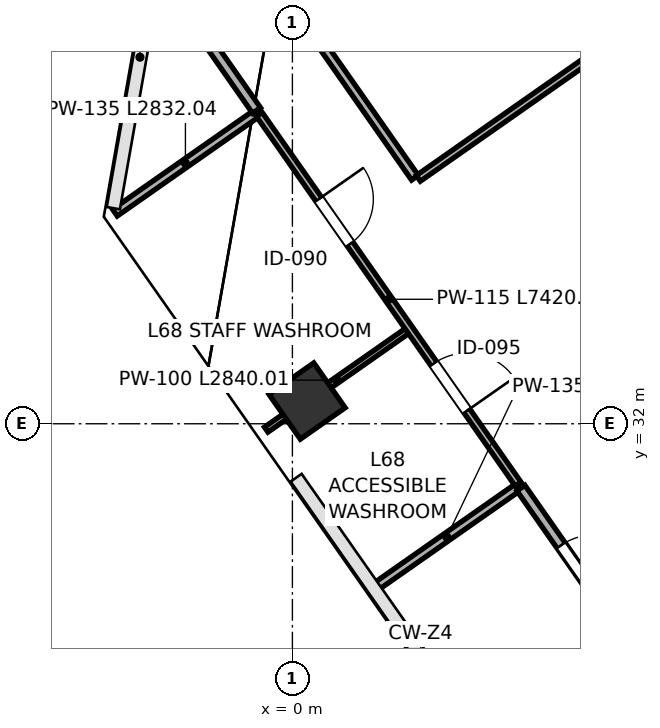
"""IFC4 building model, lengths in metres.
Left out: names, types, materials, properties, quantities, classifications, styles, units other than length and angle.
Written with IfcOpenShell. Run it as: python <this file> out.ifc"""

import sys

from ifc_helpers import new_model, si_unit, direction, frame, frame_2d, origin, origin_2d, place, context, subcontext, project, spatial, rectangle, extrude, clip, halfspace, source, transform, mapped, element, fill, save


model = new_model("IFC4")
c1 = context("Model", 3, precision=1e-05, world=origin(), true_north=direction((0.0, 1.0)))
c2 = subcontext(c1, "Body", "Model", "MODEL_VIEW")
j1 = project(units=[si_unit("LENGTHUNIT", "METRE"), si_unit("PLANEANGLEUNIT", "RADIAN")], contexts=[c1])
p1 = place(None, origin())
s1 = spatial("IfcSite", under=j1, at=p1, CompositionType="ELEMENT")
p2 = place(p1, origin())
s2 = spatial("IfcBuilding", under=s1, at=p2, CompositionType="ELEMENT")
p3 = place(p2, frame((0.0, 0.0, 303.0)))
s3 = spatial("IfcBuildingStorey", under=s2, at=p3, CompositionType="ELEMENT", Elevation=303.0)
p4 = place(p3, frame((0.241, 32.374, 0.0), z_axis=(0.008457413638, 0.215522144854, 0.976462327605), x_axis=(0.541771313725, -0.821746656519, 0.176681284024)))
e1 = element("IfcColumn", 1, at=p4, inside=s3, PredefinedType="COLUMN", context=c2, shape_type="Clipping", body=[
    clip(clip(extrude(rectangle(XDim=0.9, YDim=0.9, at=origin_2d()), origin(), (0.0, 0.0, 1.0), 4.301), halfspace(frame((0.0, 0.0, 0.139), z_axis=(0.0, 0.0, -1.0), x_axis=(1.0, 0.0, 0.0)), False)), halfspace(frame((0.0, 0.0, 4.162), z_axis=(0.0, 0.0, 1.0), x_axis=(1.0, 0.0, 0.0)), False)),
])
p5 = place(p3, frame((-2.919, 35.471, 0.0), z_axis=(0.0, 0.0, 1.0), x_axis=(0.819098241059, 0.573653267657, 0.0)))
e2 = element("IfcWall", 2, at=p5, inside=s3, PredefinedType="PARTITIONING", context=c2, shape_type="SweptSolid", body=[
    extrude(rectangle(XDim=2.832, YDim=0.135, at=frame_2d((1.416, 0.0))), origin(), (0.0, 0.0, 1.0), 3.96),
])
p6 = place(p3, frame((-2.214, 39.471, 0.0), z_axis=(0.0, 0.0, 1.0), x_axis=(0.573653267657, -0.819098241059, 0.0)))
e3 = element("IfcWall", 3, at=p6, inside=s3, PredefinedType="PARTITIONING", context=c2, shape_type="SweptSolid", body=[
    extrude(rectangle(XDim=2.832, YDim=0.16, at=frame_2d((1.416, 0.0))), origin(), (0.0, 0.0, 1.0), 3.96),
])
p7 = place(p3, frame((-0.431, 31.904, 0.0), z_axis=(0.0, 0.0, 1.0), x_axis=(0.819122867865, 0.573618102347, 0.0)))
e4 = element("IfcWall", 4, at=p7, inside=s3, PredefinedType="PARTITIONING", context=c2, shape_type="SweptSolid", body=[
    extrude(rectangle(XDim=2.84, YDim=0.1, at=frame_2d((1.42, 0.0))), origin(), (0.0, 0.0, 1.0), 3.295),
])
p8 = place(p3, frame((1.376, 29.323, 0.0), z_axis=(0.0, 0.0, 1.0), x_axis=(0.819163257805, 0.573560421458, 0.0)))
e5 = element("IfcWall", 5, at=p8, inside=s3, PredefinedType="PARTITIONING", context=c2, shape_type="SweptSolid", body=[
    extrude(rectangle(XDim=2.84, YDim=0.135, at=frame_2d((1.42, 0.0))), origin(), (0.0, 0.0, 1.0), 3.295),
])
p9 = place(p3, frame((-0.544, 37.086, 0.0), z_axis=(0.0, 0.0, 1.0), x_axis=(0.573568336404, -0.819157715873, 0.0)))
e6 = element("IfcWall", 6, at=p9, inside=s3, PredefinedType="PARTITIONING", context=c2, shape_type="SweptSolid", body=[
    extrude(rectangle(XDim=7.42, YDim=0.115, at=frame_2d((3.71, 0.0))), origin(), (0.0, 0.0, 1.0), 3.96),
])
p10 = place(p9, frame((1.7, 0.0, 0.0)))
e7 = element("IfcOpeningElement", 7, at=p10, cuts=e6, PredefinedType="OPENING", context=c2, shape_type="SweptSolid", body=[
    extrude(rectangle(XDim=0.9, YDim=2.15, at=frame_2d((0.45, 1.075))), frame((0.0, 0.067, 0.0), z_axis=(0.0, -1.0, 0.0), x_axis=(1.0, 0.0, 0.0)), (0.0, 0.0, 1.0), 0.135),
])
p11 = place(p9, frame((5.0, 0.0, 0.0)))
e8 = element("IfcOpeningElement", 8, at=p11, cuts=e6, PredefinedType="OPENING", context=c2, shape_type="SweptSolid", body=[
    extrude(rectangle(XDim=0.95, YDim=2.15, at=frame_2d((0.475, 1.075))), frame((0.0, 0.067, 0.0), z_axis=(0.0, -1.0, 0.0), x_axis=(1.0, 0.0, 0.0)), (0.0, 0.0, 1.0), 0.135),
])
p12 = place(p3, frame((3.758, 30.942, 0.0), z_axis=(0.0, 0.0, 1.0), x_axis=(0.573575634469, -0.819152605772, 0.0)))
e9 = element("IfcWall", 9, at=p12, inside=s3, PredefinedType="PARTITIONING", context=c2, shape_type="SweptSolid", body=[
    extrude(rectangle(XDim=11.57, YDim=0.16, at=frame_2d((5.785, 0.0))), origin(), (0.0, 0.0, 1.0), 3.96),
])
p13 = place(p12, frame((1.15, 0.0, 0.0)))
e10 = element("IfcOpeningElement", 10, at=p13, cuts=e9, PredefinedType="OPENING", context=c2, shape_type="SweptSolid", body=[
    extrude(rectangle(XDim=0.95, YDim=2.15, at=frame_2d((0.475, 1.075))), frame((0.0, 0.09, 0.0), z_axis=(0.0, -1.0, 0.0), x_axis=(1.0, 0.0, 0.0)), (0.0, 0.0, 1.0), 0.18),
])
p14 = place(p3, frame((-1.443, 40.985, 0.0), z_axis=(0.0, 0.0, 1.0), x_axis=(0.573587332855, -0.819144414367, 0.0)))
e11 = element("IfcWall", 11, at=p14, inside=s3, PredefinedType="PARTITIONING", context=c2, shape_type="SweptSolid", body=[
    extrude(rectangle(XDim=6.03, YDim=0.135, at=frame_2d((3.015, 0.0))), origin(), (0.0, 0.0, 1.0), 3.96),
])
p15 = place(p3, frame((2.071, 36.036, 0.0), z_axis=(0.0, 0.0, 1.0), x_axis=(0.819154854942, 0.573572422302, 0.0)))
e12 = element("IfcWall", 12, at=p15, inside=s3, PredefinedType="PARTITIONING", context=c2, shape_type="SweptSolid", body=[
    extrude(rectangle(XDim=29.62, YDim=0.115, at=frame_2d((14.81, 0.0))), origin(), (0.0, 0.0, 1.0), 3.96),
])
p16 = place(p15, frame((4.2, 0.0, 0.0)))
e13 = element("IfcOpeningElement", 13, at=p16, cuts=e12, PredefinedType="OPENING", context=c2, shape_type="SweptSolid", body=[
    extrude(rectangle(XDim=0.95, YDim=2.15, at=frame_2d((0.475, 1.075))), frame((0.0, 0.067, 0.0), z_axis=(0.0, -1.0, 0.0), x_axis=(1.0, 0.0, 0.0)), (0.0, 0.0, 1.0), 0.135),
])
m1 = source(origin(), c2, "Body", "SweptSolid", [
    extrude(rectangle(XDim=0.9, YDim=2.15, at=frame_2d((0.45, 1.075))), frame((0.0, 0.025, 0.0), z_axis=(0.0, -1.0, 0.0), x_axis=(1.0, 0.0, 0.0)), (0.0, 0.0, 1.0), 0.05),
])
p17 = place(p10, origin())
e14 = element("IfcDoor", 14, at=p17, inside=s3, OperationType="SINGLE_SWING_LEFT", PredefinedType="DOOR", context=c2, shape_type="MappedRepresentation", body=[
    mapped(m1, transform((0.0, 0.0, 0.0), scale=1.0)),
])
fill(e7, e14)
m2 = source(origin(), c2, "Body", "SweptSolid", [
    extrude(rectangle(XDim=0.95, YDim=2.15, at=frame_2d((0.475, 1.075))), frame((0.0, 0.025, 0.0), z_axis=(0.0, -1.0, 0.0), x_axis=(1.0, 0.0, 0.0)), (0.0, 0.0, 1.0), 0.05),
])
p18 = place(p11, origin())
e15 = element("IfcDoor", 15, at=p18, inside=s3, OperationType="SINGLE_SWING_RIGHT", PredefinedType="DOOR", context=c2, shape_type="MappedRepresentation", body=[
    mapped(m2, transform((0.0, 0.0, 0.0), scale=1.0)),
])
fill(e8, e15)
m3 = source(origin(), c2, "Body", "SweptSolid", [
    extrude(rectangle(XDim=0.95, YDim=2.15, at=frame_2d((0.475, 1.075))), frame((0.0, 0.025, 0.0), z_axis=(0.0, -1.0, 0.0), x_axis=(1.0, 0.0, 0.0)), (0.0, 0.0, 1.0), 0.05),
])
p19 = place(p13, origin())
e16 = element("IfcDoor", 16, at=p19, inside=s3, OperationType="SINGLE_SWING_RIGHT", PredefinedType="DOOR", context=c2, shape_type="MappedRepresentation", body=[
    mapped(m3, transform((0.0, 0.0, 0.0), scale=1.0)),
])
fill(e10, e16)
save(model, sys.argv[1])
